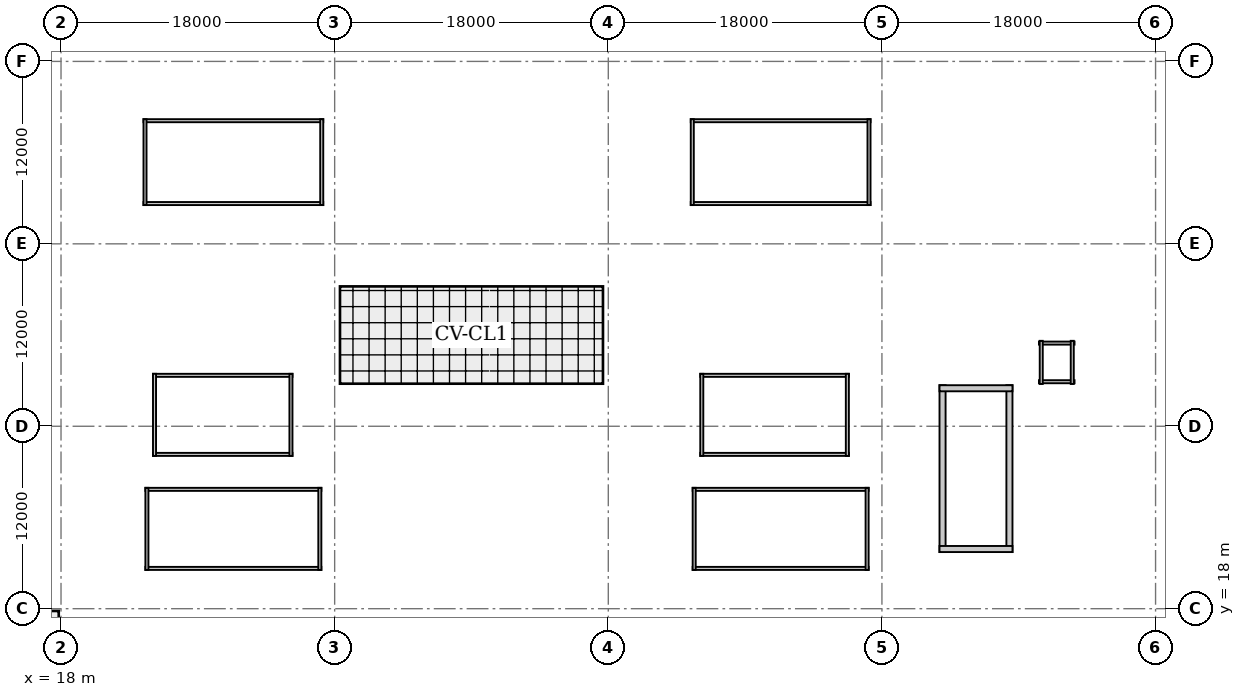
"""IFC4 building model, lengths in metres.
Left out: names, types, materials, properties, quantities, classifications, styles, units other than length and angle.
Written with IfcOpenShell. Run it as: python <this file> out.ifc"""

import sys

from ifc_helpers import new_model, si_unit, direction, frame, frame_2d, origin, origin_2d, place, context, subcontext, project, spatial, rectangle, circle, extrude, element, fill, save


model = new_model("IFC4")
c1 = context("Model", 3, precision=1e-05, world=origin(), true_north=direction((0.0, 1.0)))
c2 = subcontext(c1, "Body", "Model", "MODEL_VIEW")
j1 = project(units=[si_unit("LENGTHUNIT", "METRE"), si_unit("PLANEANGLEUNIT", "RADIAN")], contexts=[c1])
p1 = place(None, origin())
s1 = spatial("IfcSite", under=j1, at=p1, CompositionType="ELEMENT")
p2 = place(p1, origin())
s2 = spatial("IfcBuilding", under=s1, at=p2, CompositionType="ELEMENT")
p3 = place(p2, frame((0.0, 0.0, 6.6)))
s3 = spatial("IfcBuildingStorey", under=s2, at=p3, CompositionType="ELEMENT", Elevation=6.6)
for number, where, z_axis, x_axis in (
    (1, (18.0, 18.0, 0.0), (0.0, 0.0, 1.0), (1.0, 0.0, 0.0)),
    (2, (18.0, 30.0, 0.0), (0.0, 0.0, 1.0), (1.0, 0.0, 0.0)),
    (3, (18.0, 36.0, 0.0), (0.0, 0.0, 1.0), (1.0, 0.0, 0.0)),
    (4, (18.0, 42.0, 0.0), (0.0, 0.0, 1.0), (1.0, 0.0, 0.0)),
    (5, (18.0, 54.0, 0.0), (0.0, 0.0, 1.0), (1.0, 0.0, 0.0)),
    (6, (36.0, 18.0, 0.0), (0.0, 0.0, 1.0), (1.0, 0.0, 0.0)),
    (7, (36.0, 30.0, 0.0), (0.0, 0.0, 1.0), (1.0, 0.0, 0.0)),
    (8, (36.0, 36.0, 0.0), (0.0, 0.0, 1.0), (1.0, 0.0, 0.0)),
    (9, (36.0, 42.0, 0.0), (0.0, 0.0, 1.0), (1.0, 0.0, 0.0)),
    (10, (36.0, 54.0, 0.0), (0.0, 0.0, 1.0), (1.0, 0.0, 0.0)),
    (11, (54.0, 18.0, 0.0), (0.0, 0.0, 1.0), (1.0, 0.0, 0.0)),
    (12, (54.0, 30.0, 0.0), (0.0, 0.0, 1.0), (1.0, 0.0, 0.0)),
    (13, (54.0, 36.0, 0.0), (0.0, 0.0, 1.0), (1.0, 0.0, 0.0)),
    (14, (54.0, 42.0, 0.0), (0.0, 0.0, 1.0), (1.0, 0.0, 0.0)),
    (15, (54.0, 54.0, 0.0), (0.0, 0.0, 1.0), (1.0, 0.0, 0.0)),
    (16, (72.0, 18.0, 0.0), (0.0, 0.0, 1.0), (1.0, 0.0, 0.0)),
    (17, (72.0, 30.0, 0.0), (0.0, 0.0, 1.0), (1.0, 0.0, 0.0)),
    (18, (72.0, 36.0, 0.0), (0.0, 0.0, 1.0), (1.0, 0.0, 0.0)),
    (19, (72.0, 42.0, 0.0), (0.0, 0.0, 1.0), (1.0, 0.0, 0.0)),
    (20, (72.0, 54.0, 0.0), (0.0, 0.0, 1.0), (1.0, 0.0, 0.0)),
    (21, (90.0, 18.0, 0.0), (0.0, 0.0, 1.0), (1.0, 0.0, 0.0)),
    (22, (90.0, 30.0, 0.0), (0.0, 0.0, 1.0), (1.0, 0.0, 0.0)),
    (23, (90.0, 36.0, 0.0), (0.0, 0.0, 1.0), (1.0, 0.0, 0.0)),
    (24, (90.0, 42.0, 0.0), (0.0, 0.0, 1.0), (1.0, 0.0, 0.0)),
    (25, (90.0, 54.0, 0.0), (0.0, 0.0, 1.0), (1.0, 0.0, 0.0)),
):
    element("IfcColumn", number, at=place(p3, frame(where, z_axis=z_axis, x_axis=x_axis)), inside=s3, PredefinedType="COLUMN", context=c2, shape_type="SweptSolid", body=[
        extrude(circle(Radius=0.4, at=origin_2d()), origin(), (0.0, 0.0, 1.0), 4.2),
    ])
for number, where, z_axis, x_axis in (
    (26, (80.387, 21.725, 0.0), (0.0, 0.0, 1.0), (0.0, 1.0, 0.0)),
    (27, (75.988, 32.7, 0.0), (0.0, 0.0, 1.0), (0.0, -1.0, 0.0)),
):
    element("IfcWall", number, at=place(p3, frame(where, z_axis=z_axis, x_axis=x_axis)), inside=s3, PredefinedType="SHEAR", context=c2, shape_type="SweptSolid", body=[
        extrude(rectangle(XDim=10.975, YDim=0.4, at=frame_2d((5.487, 0.0))), origin(), (0.0, 0.0, 1.0), 3.98),
    ])
p4 = place(p3, frame((80.587, 32.5, 0.0), z_axis=(0.0, 0.0, 1.0), x_axis=(-1.0, 0.0, 0.0)))
e28 = element("IfcWall", 28, at=p4, inside=s3, PredefinedType="SHEAR", context=c2, shape_type="SweptSolid", body=[
    extrude(rectangle(XDim=4.8, YDim=0.4, at=frame_2d((2.4, 0.0))), origin(), (0.0, 0.0, 1.0), 3.98),
])
p5 = place(p3, frame((75.788, 21.925, 0.0), z_axis=(0.0, 0.0, 1.0), x_axis=(1.0, 0.0, 0.0)))
e29 = element("IfcWall", 29, at=p5, inside=s3, PredefinedType="SHEAR", context=c2, shape_type="SweptSolid", body=[
    extrude(rectangle(XDim=4.8, YDim=0.4, at=frame_2d((2.4, 0.0))), origin(), (0.0, 0.0, 1.0), 3.98),
])
p6 = place(p5, frame((1.1, 0.0, 0.0)))
e30 = element("IfcOpeningElement", 30, at=p6, cuts=e29, PredefinedType="OPENING", context=c2, shape_type="SweptSolid", body=[
    extrude(rectangle(XDim=1.3, YDim=2.1, at=frame_2d((0.65, 1.05))), frame((0.0, 0.21, 0.0), z_axis=(0.0, -1.0, 0.0), x_axis=(1.0, 0.0, 0.0)), (0.0, 0.0, 1.0), 0.42),
])
for number, where, z_axis, x_axis in (
    (31, (23.55, 20.65, 0.0), (0.0, 0.0, 1.0), (1.0, 0.0, 0.0)),
    (32, (35.125, 25.85, 0.0), (0.0, 0.0, 1.0), (-1.0, 0.0, 0.0)),
):
    element("IfcWall", number, at=place(p3, frame(where, z_axis=z_axis, x_axis=x_axis)), inside=s3, PredefinedType="SOLIDWALL", context=c2, shape_type="SweptSolid", body=[
        extrude(rectangle(XDim=11.575, YDim=0.2, at=frame_2d((5.788, 0.0))), origin(), (0.0, 0.0, 1.0), 2.45),
    ])
p7 = place(p3, frame((35.025, 20.55, 0.0), z_axis=(0.0, 0.0, 1.0), x_axis=(0.0, 1.0, 0.0)))
e33 = element("IfcWall", 33, at=p7, inside=s3, PredefinedType="SOLIDWALL", context=c2, shape_type="SweptSolid", body=[
    extrude(rectangle(XDim=5.4, YDim=0.2, at=frame_2d((2.7, 0.0))), origin(), (0.0, 0.0, 1.0), 2.45),
])
p8 = place(p3, frame((23.65, 25.95, 0.0), z_axis=(0.0, 0.0, 1.0), x_axis=(0.0, -1.0, 0.0)))
e34 = element("IfcWall", 34, at=p8, inside=s3, PredefinedType="SOLIDWALL", context=c2, shape_type="SweptSolid", body=[
    extrude(rectangle(XDim=5.4, YDim=0.2, at=frame_2d((2.7, 0.0))), origin(), (0.0, 0.0, 1.0), 2.45),
])
p9 = place(p8, frame((1.9, 0.0, 0.0)))
e35 = element("IfcOpeningElement", 35, at=p9, cuts=e34, PredefinedType="OPENING", context=c2, shape_type="SweptSolid", body=[
    extrude(rectangle(XDim=1.6, YDim=2.15, at=frame_2d((0.8, 1.075))), frame((0.0, 0.11, 0.0), z_axis=(0.0, -1.0, 0.0), x_axis=(1.0, 0.0, 0.0)), (0.0, 0.0, 1.0), 0.22),
])
for number, where, z_axis, x_axis in (
    (36, (59.55, 20.65, 0.0), (0.0, 0.0, 1.0), (1.0, 0.0, 0.0)),
    (37, (71.125, 25.85, 0.0), (0.0, 0.0, 1.0), (-1.0, 0.0, 0.0)),
):
    element("IfcWall", number, at=place(p3, frame(where, z_axis=z_axis, x_axis=x_axis)), inside=s3, PredefinedType="SOLIDWALL", context=c2, shape_type="SweptSolid", body=[
        extrude(rectangle(XDim=11.575, YDim=0.2, at=frame_2d((5.788, 0.0))), origin(), (0.0, 0.0, 1.0), 2.45),
    ])
p10 = place(p3, frame((71.025, 20.55, 0.0), z_axis=(0.0, 0.0, 1.0), x_axis=(0.0, 1.0, 0.0)))
e38 = element("IfcWall", 38, at=p10, inside=s3, PredefinedType="SOLIDWALL", context=c2, shape_type="SweptSolid", body=[
    extrude(rectangle(XDim=5.4, YDim=0.2, at=frame_2d((2.7, 0.0))), origin(), (0.0, 0.0, 1.0), 2.45),
])
p11 = place(p3, frame((59.65, 25.95, 0.0), z_axis=(0.0, 0.0, 1.0), x_axis=(0.0, -1.0, 0.0)))
e39 = element("IfcWall", 39, at=p11, inside=s3, PredefinedType="SOLIDWALL", context=c2, shape_type="SweptSolid", body=[
    extrude(rectangle(XDim=5.4, YDim=0.2, at=frame_2d((2.7, 0.0))), origin(), (0.0, 0.0, 1.0), 2.45),
])
p12 = place(p11, frame((1.9, 0.0, 0.0)))
e40 = element("IfcOpeningElement", 40, at=p12, cuts=e39, PredefinedType="OPENING", context=c2, shape_type="SweptSolid", body=[
    extrude(rectangle(XDim=1.6, YDim=2.15, at=frame_2d((0.8, 1.075))), frame((0.0, 0.11, 0.0), z_axis=(0.0, -1.0, 0.0), x_axis=(1.0, 0.0, 0.0)), (0.0, 0.0, 1.0), 0.22),
])
for number, where, z_axis, x_axis in (
    (41, (23.425, 44.65, 0.0), (0.0, 0.0, 1.0), (1.0, 0.0, 0.0)),
    (42, (35.25, 50.1, 0.0), (0.0, 0.0, 1.0), (-1.0, 0.0, 0.0)),
):
    element("IfcWall", number, at=place(p3, frame(where, z_axis=z_axis, x_axis=x_axis)), inside=s3, PredefinedType="SOLIDWALL", context=c2, shape_type="SweptSolid", body=[
        extrude(rectangle(XDim=11.825, YDim=0.2, at=frame_2d((5.913, 0.0))), origin(), (0.0, 0.0, 1.0), 2.45),
    ])
p13 = place(p3, frame((35.15, 44.55, 0.0), z_axis=(0.0, 0.0, 1.0), x_axis=(0.0, 1.0, 0.0)))
e43 = element("IfcWall", 43, at=p13, inside=s3, PredefinedType="SOLIDWALL", context=c2, shape_type="SweptSolid", body=[
    extrude(rectangle(XDim=5.65, YDim=0.2, at=frame_2d((2.825, 0.0))), origin(), (0.0, 0.0, 1.0), 2.45),
])
p14 = place(p3, frame((23.525, 50.2, 0.0), z_axis=(0.0, 0.0, 1.0), x_axis=(0.0, -1.0, 0.0)))
e44 = element("IfcWall", 44, at=p14, inside=s3, PredefinedType="SOLIDWALL", context=c2, shape_type="SweptSolid", body=[
    extrude(rectangle(XDim=5.65, YDim=0.2, at=frame_2d((2.825, 0.0))), origin(), (0.0, 0.0, 1.0), 2.45),
])
p15 = place(p14, frame((2.025, 0.0, 0.0)))
e45 = element("IfcOpeningElement", 45, at=p15, cuts=e44, PredefinedType="OPENING", context=c2, shape_type="SweptSolid", body=[
    extrude(rectangle(XDim=1.6, YDim=2.15, at=frame_2d((0.8, 1.075))), frame((0.0, 0.11, 0.0), z_axis=(0.0, -1.0, 0.0), x_axis=(1.0, 0.0, 0.0)), (0.0, 0.0, 1.0), 0.22),
])
for number, where, z_axis, x_axis in (
    (46, (59.425, 44.65, 0.0), (0.0, 0.0, 1.0), (1.0, 0.0, 0.0)),
    (47, (71.25, 50.1, 0.0), (0.0, 0.0, 1.0), (-1.0, 0.0, 0.0)),
):
    element("IfcWall", number, at=place(p3, frame(where, z_axis=z_axis, x_axis=x_axis)), inside=s3, PredefinedType="SOLIDWALL", context=c2, shape_type="SweptSolid", body=[
        extrude(rectangle(XDim=11.825, YDim=0.2, at=frame_2d((5.913, 0.0))), origin(), (0.0, 0.0, 1.0), 2.45),
    ])
p16 = place(p3, frame((71.15, 44.55, 0.0), z_axis=(0.0, 0.0, 1.0), x_axis=(0.0, 1.0, 0.0)))
e48 = element("IfcWall", 48, at=p16, inside=s3, PredefinedType="SOLIDWALL", context=c2, shape_type="SweptSolid", body=[
    extrude(rectangle(XDim=5.65, YDim=0.2, at=frame_2d((2.825, 0.0))), origin(), (0.0, 0.0, 1.0), 2.45),
])
p17 = place(p3, frame((59.525, 50.2, 0.0), z_axis=(0.0, 0.0, 1.0), x_axis=(0.0, -1.0, 0.0)))
e49 = element("IfcWall", 49, at=p17, inside=s3, PredefinedType="SOLIDWALL", context=c2, shape_type="SweptSolid", body=[
    extrude(rectangle(XDim=5.65, YDim=0.2, at=frame_2d((2.825, 0.0))), origin(), (0.0, 0.0, 1.0), 2.45),
])
p18 = place(p17, frame((2.025, 0.0, 0.0)))
e50 = element("IfcOpeningElement", 50, at=p18, cuts=e49, PredefinedType="OPENING", context=c2, shape_type="SweptSolid", body=[
    extrude(rectangle(XDim=1.6, YDim=2.15, at=frame_2d((0.8, 1.075))), frame((0.0, 0.11, 0.0), z_axis=(0.0, -1.0, 0.0), x_axis=(1.0, 0.0, 0.0)), (0.0, 0.0, 1.0), 0.22),
])
for number, where, z_axis, x_axis in (
    (51, (24.05, 28.15, 0.0), (0.0, 0.0, 1.0), (1.0, 0.0, 0.0)),
    (52, (33.225, 33.35, 0.0), (0.0, 0.0, 1.0), (-1.0, 0.0, 0.0)),
):
    element("IfcWall", number, at=place(p3, frame(where, z_axis=z_axis, x_axis=x_axis)), inside=s3, PredefinedType="SOLIDWALL", context=c2, shape_type="SweptSolid", body=[
        extrude(rectangle(XDim=9.175, YDim=0.2, at=frame_2d((4.587, 0.0))), origin(), (0.0, 0.0, 1.0), 3.98),
    ])
p19 = place(p3, frame((33.125, 28.05, 0.0), z_axis=(0.0, 0.0, 1.0), x_axis=(0.0, 1.0, 0.0)))
e53 = element("IfcWall", 53, at=p19, inside=s3, PredefinedType="SOLIDWALL", context=c2, shape_type="SweptSolid", body=[
    extrude(rectangle(XDim=5.4, YDim=0.2, at=frame_2d((2.7, 0.0))), origin(), (0.0, 0.0, 1.0), 3.98),
])
p20 = place(p3, frame((24.15, 33.45, 0.0), z_axis=(0.0, 0.0, 1.0), x_axis=(0.0, -1.0, 0.0)))
e54 = element("IfcWall", 54, at=p20, inside=s3, PredefinedType="SOLIDWALL", context=c2, shape_type="SweptSolid", body=[
    extrude(rectangle(XDim=5.4, YDim=0.2, at=frame_2d((2.7, 0.0))), origin(), (0.0, 0.0, 1.0), 3.955),
])
p21 = place(p20, frame((1.9, 0.0, 0.0)))
e55 = element("IfcOpeningElement", 55, at=p21, cuts=e54, PredefinedType="OPENING", context=c2, shape_type="SweptSolid", body=[
    extrude(rectangle(XDim=1.6, YDim=2.15, at=frame_2d((0.8, 1.075))), frame((0.0, 0.11, 0.0), z_axis=(0.0, -1.0, 0.0), x_axis=(1.0, 0.0, 0.0)), (0.0, 0.0, 1.0), 0.22),
])
for number, where, z_axis, x_axis in (
    (56, (60.05, 28.15, 0.0), (0.0, 0.0, 1.0), (1.0, 0.0, 0.0)),
    (57, (69.825, 33.35, 0.0), (0.0, 0.0, 1.0), (-1.0, 0.0, 0.0)),
):
    element("IfcWall", number, at=place(p3, frame(where, z_axis=z_axis, x_axis=x_axis)), inside=s3, PredefinedType="SOLIDWALL", context=c2, shape_type="SweptSolid", body=[
        extrude(rectangle(XDim=9.775, YDim=0.2, at=frame_2d((4.887, 0.0))), origin(), (0.0, 0.0, 1.0), 3.98),
    ])
p22 = place(p3, frame((69.725, 28.05, 0.0), z_axis=(0.0, 0.0, 1.0), x_axis=(0.0, 1.0, 0.0)))
e58 = element("IfcWall", 58, at=p22, inside=s3, PredefinedType="SOLIDWALL", context=c2, shape_type="SweptSolid", body=[
    extrude(rectangle(XDim=5.4, YDim=0.2, at=frame_2d((2.7, 0.0))), origin(), (0.0, 0.0, 1.0), 3.98),
])
p23 = place(p3, frame((60.15, 33.45, 0.0), z_axis=(0.0, 0.0, 1.0), x_axis=(0.0, -1.0, 0.0)))
e59 = element("IfcWall", 59, at=p23, inside=s3, PredefinedType="SOLIDWALL", context=c2, shape_type="SweptSolid", body=[
    extrude(rectangle(XDim=5.4, YDim=0.2, at=frame_2d((2.7, 0.0))), origin(), (0.0, 0.0, 1.0), 3.955),
])
p24 = place(p23, frame((1.9, 0.0, 0.0)))
e60 = element("IfcOpeningElement", 60, at=p24, cuts=e59, PredefinedType="OPENING", context=c2, shape_type="SweptSolid", body=[
    extrude(rectangle(XDim=1.6, YDim=2.15, at=frame_2d((0.8, 1.075))), frame((0.0, 0.11, 0.0), z_axis=(0.0, -1.0, 0.0), x_axis=(1.0, 0.0, 0.0)), (0.0, 0.0, 1.0), 0.22),
])
p25 = place(p3, frame((82.33, 32.93, 0.0), z_axis=(0.0, 0.0, 1.0), x_axis=(1.0, 0.0, 0.0)))
e61 = element("IfcWall", 61, at=p25, inside=s3, PredefinedType="SOLIDWALL", context=c2, shape_type="SweptSolid", body=[
    extrude(rectangle(XDim=2.34, YDim=0.2, at=frame_2d((1.17, 0.0))), origin(), (0.0, 0.0, 1.0), 3.955),
])
p26 = place(p3, frame((84.67, 35.47, 0.0), z_axis=(0.0, 0.0, 1.0), x_axis=(-1.0, 0.0, 0.0)))
e62 = element("IfcWall", 62, at=p26, inside=s3, PredefinedType="SOLIDWALL", context=c2, shape_type="SweptSolid", body=[
    extrude(rectangle(XDim=2.34, YDim=0.2, at=frame_2d((1.17, 0.0))), origin(), (0.0, 0.0, 1.0), 3.255),
])
p27 = place(p3, frame((82.48, 35.62, 0.0), z_axis=(0.0, 0.0, 1.0), x_axis=(0.0, -1.0, 0.0)))
e63 = element("IfcWall", 63, at=p27, inside=s3, PredefinedType="SOLIDWALL", context=c2, shape_type="SweptSolid", body=[
    extrude(rectangle(XDim=2.84, YDim=0.2, at=frame_2d((1.42, 0.0))), origin(), (0.0, 0.0, 1.0), 3.255),
])
p28 = place(p27, frame((0.87, 0.0, 0.0)))
e64 = element("IfcOpeningElement", 64, at=p28, cuts=e63, PredefinedType="OPENING", context=c2, shape_type="SweptSolid", body=[
    extrude(rectangle(XDim=1.1, YDim=2.15, at=frame_2d((0.55, 1.075))), frame((0.0, 0.11, 0.0), z_axis=(0.0, -1.0, 0.0), x_axis=(1.0, 0.0, 0.0)), (0.0, 0.0, 1.0), 0.22),
])
p29 = place(p3, frame((84.52, 32.78, 0.0), z_axis=(0.0, 0.0, 1.0), x_axis=(0.0, 1.0, 0.0)))
e65 = element("IfcWall", 65, at=p29, inside=s3, PredefinedType="SOLIDWALL", context=c2, shape_type="SweptSolid", body=[
    extrude(rectangle(XDim=2.84, YDim=0.2, at=frame_2d((1.42, 0.0))), origin(), (0.0, 0.0, 1.0), 3.255),
])
p30 = place(p6, origin())
e66 = element("IfcDoor", 66, at=p30, inside=s3, OperationType="SINGLE_SWING_RIGHT", PredefinedType="DOOR", context=c2, shape_type="SweptSolid", body=[
    extrude(rectangle(XDim=1.3, YDim=2.1, at=frame_2d((0.65, 1.05))), frame((0.0, 0.025, 0.0), z_axis=(0.0, -1.0, 0.0), x_axis=(1.0, 0.0, 0.0)), (0.0, 0.0, 1.0), 0.05),
])
fill(e30, e66)
p31 = place(p9, origin())
e67 = element("IfcDoor", 67, at=p31, inside=s3, OperationType="SINGLE_SWING_LEFT", PredefinedType="DOOR", context=c2, shape_type="SweptSolid", body=[
    extrude(rectangle(XDim=1.6, YDim=2.15, at=frame_2d((0.8, 1.075))), frame((0.0, 0.025, 0.0), z_axis=(0.0, -1.0, 0.0), x_axis=(1.0, 0.0, 0.0)), (0.0, 0.0, 1.0), 0.05),
])
fill(e35, e67)
p32 = place(p12, origin())
e68 = element("IfcDoor", 68, at=p32, inside=s3, OperationType="SINGLE_SWING_LEFT", PredefinedType="DOOR", context=c2, shape_type="SweptSolid", body=[
    extrude(rectangle(XDim=1.6, YDim=2.15, at=frame_2d((0.8, 1.075))), frame((0.0, 0.025, 0.0), z_axis=(0.0, -1.0, 0.0), x_axis=(1.0, 0.0, 0.0)), (0.0, 0.0, 1.0), 0.05),
])
fill(e40, e68)
p33 = place(p15, origin())
e69 = element("IfcDoor", 69, at=p33, inside=s3, OperationType="SINGLE_SWING_LEFT", PredefinedType="DOOR", context=c2, shape_type="SweptSolid", body=[
    extrude(rectangle(XDim=1.6, YDim=2.15, at=frame_2d((0.8, 1.075))), frame((0.0, 0.025, 0.0), z_axis=(0.0, -1.0, 0.0), x_axis=(1.0, 0.0, 0.0)), (0.0, 0.0, 1.0), 0.05),
])
fill(e45, e69)
p34 = place(p18, origin())
e70 = element("IfcDoor", 70, at=p34, inside=s3, OperationType="SINGLE_SWING_LEFT", PredefinedType="DOOR", context=c2, shape_type="SweptSolid", body=[
    extrude(rectangle(XDim=1.6, YDim=2.15, at=frame_2d((0.8, 1.075))), frame((0.0, 0.025, 0.0), z_axis=(0.0, -1.0, 0.0), x_axis=(1.0, 0.0, 0.0)), (0.0, 0.0, 1.0), 0.05),
])
fill(e50, e70)
p35 = place(p21, origin())
e71 = element("IfcDoor", 71, at=p35, inside=s3, OperationType="SINGLE_SWING_RIGHT", PredefinedType="DOOR", context=c2, shape_type="SweptSolid", body=[
    extrude(rectangle(XDim=1.6, YDim=2.15, at=frame_2d((0.8, 1.075))), frame((0.0, 0.025, 0.0), z_axis=(0.0, -1.0, 0.0), x_axis=(1.0, 0.0, 0.0)), (0.0, 0.0, 1.0), 0.05),
])
fill(e55, e71)
p36 = place(p24, origin())
e72 = element("IfcDoor", 72, at=p36, inside=s3, OperationType="SINGLE_SWING_RIGHT", PredefinedType="DOOR", context=c2, shape_type="SweptSolid", body=[
    extrude(rectangle(XDim=1.6, YDim=2.15, at=frame_2d((0.8, 1.075))), frame((0.0, 0.025, 0.0), z_axis=(0.0, -1.0, 0.0), x_axis=(1.0, 0.0, 0.0)), (0.0, 0.0, 1.0), 0.05),
])
fill(e60, e72)
p37 = place(p28, origin())
e73 = element("IfcDoor", 73, at=p37, inside=s3, OperationType="SLIDING_TO_LEFT", PredefinedType="DOOR", context=c2, shape_type="SweptSolid", body=[
    extrude(rectangle(XDim=1.1, YDim=2.15, at=frame_2d((0.55, 1.075))), frame((0.0, 0.025, 0.0), z_axis=(0.0, -1.0, 0.0), x_axis=(1.0, 0.0, 0.0)), (0.0, 0.0, 1.0), 0.05),
])
fill(e64, e73)
save(model, sys.argv[1])
